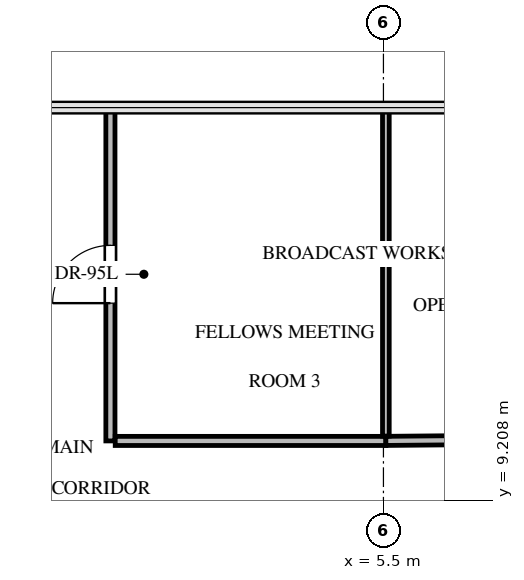
"""IFC4 building model, lengths in metres.
Left out: names, types, materials, properties, quantities, classifications, styles, units other than length and angle.
Written with IfcOpenShell. Run it as: python <this file> out.ifc"""

import sys

from ifc_helpers import new_model, si_unit, direction, frame, frame_2d, origin, place, context, subcontext, project, spatial, rectangle, extrude, source, transform, mapped, element, fill, save


model = new_model("IFC4")
c1 = context("Model", 3, precision=1e-05, world=origin(), true_north=direction((0.0, 1.0)))
c2 = subcontext(c1, "Body", "Model", "MODEL_VIEW")
j1 = project(units=[si_unit("LENGTHUNIT", "METRE"), si_unit("PLANEANGLEUNIT", "RADIAN")], contexts=[c1])
p1 = place(None, origin())
s1 = spatial("IfcSite", under=j1, at=p1, CompositionType="ELEMENT")
p2 = place(p1, origin())
s2 = spatial("IfcBuilding", under=s1, at=p2, CompositionType="ELEMENT")
p3 = place(p2, frame((0.0, 0.0, 251.3)))
s3 = spatial("IfcBuildingStorey", under=s2, at=p3, CompositionType="ELEMENT", Elevation=251.3)
p4 = place(p3, frame((1.01, 10.18, 0.0), z_axis=(0.0, 0.0, 1.0), x_axis=(0.0, 1.0, 0.0)))
e1 = element("IfcWall", 1, at=p4, inside=s3, PredefinedType="PARTITIONING", context=c2, shape_type="SweptSolid", body=[
    extrude(rectangle(XDim=5.482, YDim=0.15, at=frame_2d((2.741, 0.0))), origin(), (0.0, 0.0, 1.0), 2.499),
])
p5 = place(p4, frame((2.266, 0.0, 0.0)))
e2 = element("IfcOpeningElement", 2, at=p5, cuts=e1, PredefinedType="OPENING", context=c2, shape_type="SweptSolid", body=[
    extrude(rectangle(XDim=0.95, YDim=2.1, at=frame_2d((0.475, 1.05))), frame((0.0, 0.085, 0.0), z_axis=(0.0, -1.0, 0.0), x_axis=(1.0, 0.0, 0.0)), (0.0, 0.0, 1.0), 0.17),
])
p6 = place(p3, frame((5.54, 10.18, 0.0), z_axis=(0.0, 0.0, 1.0), x_axis=(-1.0, 0.0, 0.0)))
e3 = element("IfcWall", 3, at=p6, inside=s3, PredefinedType="PARTITIONING", context=c2, shape_type="SweptSolid", body=[
    extrude(rectangle(XDim=4.451, YDim=0.15, at=frame_2d((2.226, 0.0))), origin(), (0.0, 0.0, 1.0), 2.708),
])
p7 = place(p3, frame((12.368, 10.243, 0.0), z_axis=(0.0, 0.0, 1.0), x_axis=(-0.999958440586, -0.009116858034, 0.0)))
e4 = element("IfcWall", 4, at=p7, inside=s3, PredefinedType="PARTITIONING", context=c2, shape_type="SweptSolid", body=[
    extrude(rectangle(XDim=6.829, YDim=0.15, at=frame_2d((3.414, 0.0))), origin(), (0.0, 0.0, 1.0), 2.401),
])
p8 = place(p7, frame((2.954, 0.0, 0.0)))
e5 = element("IfcOpeningElement", 5, at=p8, cuts=e4, PredefinedType="OPENING", context=c2, shape_type="SweptSolid", body=[
    extrude(rectangle(XDim=0.92, YDim=2.1, at=frame_2d((0.46, 1.05))), frame((0.0, 0.085, 0.0), z_axis=(0.0, -1.0, 0.0), x_axis=(1.0, 0.0, 0.0)), (0.0, 0.0, 1.0), 0.17),
])
p9 = place(p3, frame((5.54, 15.662, 0.0), z_axis=(0.0, 0.0, 1.0), x_axis=(0.0, -1.0, 0.0)))
e6 = element("IfcWall", 6, at=p9, inside=s3, PredefinedType="MOVABLE", context=c2, shape_type="SweptSolid", body=[
    extrude(rectangle(XDim=5.402, YDim=0.11, at=frame_2d((2.701, 0.0))), origin(), (0.0, 0.0, 1.0), 2.499),
])
m1 = source(origin(), c2, "Body", "SweptSolid", [
    extrude(rectangle(XDim=0.95, YDim=2.1, at=frame_2d((0.475, 1.05))), frame((0.0, 0.025, 0.0), z_axis=(0.0, -1.0, 0.0), x_axis=(1.0, 0.0, 0.0)), (0.0, 0.0, 1.0), 0.05),
])
p10 = place(p5, origin())
e7 = element("IfcDoor", 7, at=p10, inside=s3, OperationType="SINGLE_SWING_LEFT", PredefinedType="DOOR", context=c2, shape_type="MappedRepresentation", body=[
    mapped(m1, transform((0.0, 0.0, 0.0), x_axis=(1.0, 0.0, 0.0), y_axis=(0.0, 1.0, 0.0), z_axis=(0.0, 0.0, 1.0), scale=1.0)),
])
fill(e2, e7)
save(model, sys.argv[1])
